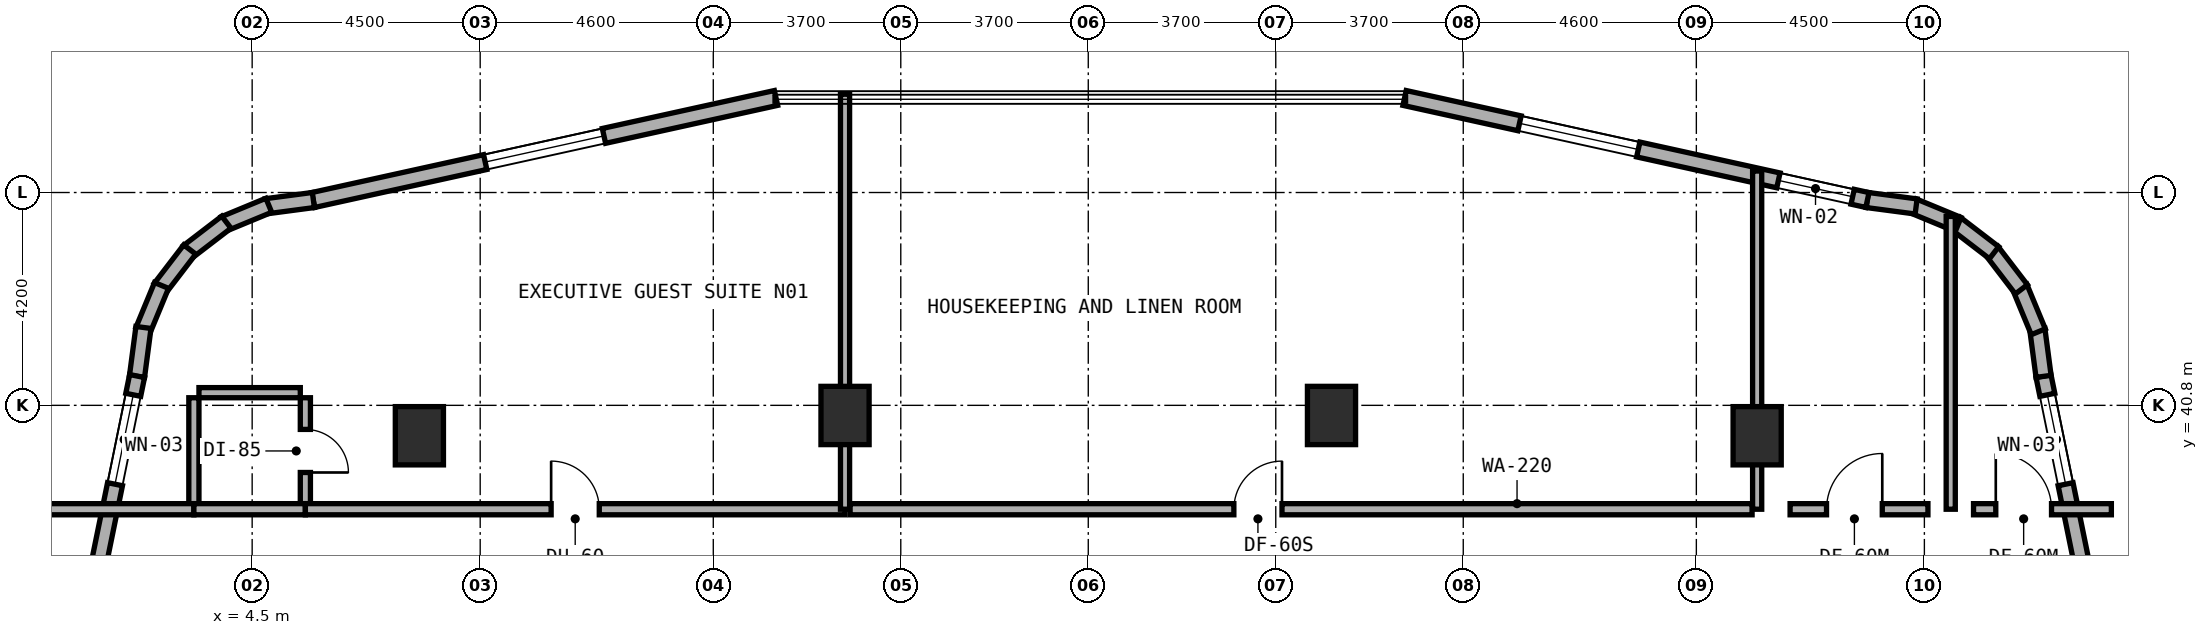
"""IFC4 building model, lengths in metres.
Left out: names, types, materials, properties, quantities, classifications, styles, units other than length and angle.
Written with IfcOpenShell. Run it as: python <this file> out.ifc"""

import sys

from ifc_helpers import new_model, si_unit, direction, frame, frame_2d, origin, origin_2d, place, context, subcontext, project, spatial, rectangle, extrude, element, fill, save


model = new_model("IFC4")
c1 = context("Model", 3, precision=1e-05, world=origin(), true_north=direction((0.0, 1.0)))
c2 = subcontext(c1, "Body", "Model", "MODEL_VIEW")
j1 = project(units=[si_unit("LENGTHUNIT", "METRE"), si_unit("PLANEANGLEUNIT", "RADIAN")], contexts=[c1])
p1 = place(None, origin())
s1 = spatial("IfcSite", under=j1, at=p1, CompositionType="ELEMENT")
p2 = place(p1, origin())
s2 = spatial("IfcBuilding", under=s1, at=p2, CompositionType="ELEMENT")
p3 = place(p2, frame((0.0, 0.0, 62.5)))
s3 = spatial("IfcBuildingStorey", under=s2, at=p3, CompositionType="ELEMENT", Elevation=62.5)
for number, where, z_axis, x_axis in (
    (1, (16.2, 40.6, 0.0), (0.0, 0.0, 1.0), (1.0, 0.0, 0.0)),
    (2, (25.8, 40.6, 0.0), (0.0, 0.0, 1.0), (1.0, 0.0, 0.0)),
    (3, (34.2, 40.2, 0.0), (0.0, 0.0, 1.0), (1.0, 0.0, 0.0)),
    (4, (7.8, 40.2, 0.0), (0.0, 0.0, 1.0), (1.0, 0.0, 0.0)),
):
    element("IfcColumn", number, at=place(p3, frame(where, z_axis=z_axis, x_axis=x_axis)), inside=s3, PredefinedType="COLUMN", context=c2, shape_type="SweptSolid", body=[
        extrude(rectangle(XDim=0.95, YDim=1.15, at=origin_2d()), origin(), (0.0, 0.0, 1.0), 3.5),
    ])
p4 = place(p3, frame((41.864, 31.516, 0.0), z_axis=(0.0, 0.0, 1.0), x_axis=(-0.199990901713, 0.979797754249, 0.0)))
e5 = element("IfcWall", 5, at=p4, inside=s3, PredefinedType="STANDARD", context=c2, shape_type="SweptSolid", body=[
    extrude(rectangle(XDim=10.065, YDim=0.3, at=frame_2d((5.033, 0.0))), origin(), (0.0, 0.0, 1.0), 3.22),
])
p5 = place(p4, frame((2.429, 0.0, 0.8)))
e6 = element("IfcOpeningElement", 6, at=p5, cuts=e5, PredefinedType="OPENING", context=c2, shape_type="SweptSolid", body=[
    extrude(rectangle(XDim=2.4, YDim=1.6, at=frame_2d((1.2, 0.8))), frame((0.0, 0.16, 0.0), z_axis=(0.0, -1.0, 0.0), x_axis=(1.0, 0.0, 0.0)), (0.0, 0.0, 1.0), 0.32),
])
p6 = place(p4, frame((7.887, 0.0, 0.85)))
e7 = element("IfcOpeningElement", 7, at=p6, cuts=e5, PredefinedType="OPENING", context=c2, shape_type="SweptSolid", body=[
    extrude(rectangle(XDim=1.8, YDim=1.5, at=frame_2d((0.9, 0.75))), frame((0.0, 0.16, 0.0), z_axis=(0.0, -1.0, 0.0), x_axis=(1.0, 0.0, 0.0)), (0.0, 0.0, 1.0), 0.32),
])
p7 = place(p3, frame((39.852, 41.372, 0.0), z_axis=(0.0, 0.0, 1.0), x_axis=(-0.131174864804, 0.991359246108, 0.0)))
e8 = element("IfcWall", 8, at=p7, inside=s3, PredefinedType="STANDARD", context=c2, shape_type="SweptSolid", body=[
    extrude(rectangle(XDim=0.938, YDim=0.3, at=frame_2d((0.469, 0.0))), origin(), (0.0, 0.0, 1.0), 3.22),
])
p8 = place(p3, frame((39.748, 42.252, 0.0), z_axis=(0.0, 0.0, 1.0), x_axis=(-0.382344263057, 0.924019948111, 0.0)))
e9 = element("IfcWall", 9, at=p8, inside=s3, PredefinedType="STANDARD", context=c2, shape_type="SweptSolid", body=[
    extrude(rectangle(XDim=0.955, YDim=0.3, at=frame_2d((0.477, 0.0))), origin(), (0.0, 0.0, 1.0), 3.22),
])
p9 = place(p3, frame((39.414, 43.089, 0.0), z_axis=(0.0, 0.0, 1.0), x_axis=(-0.608474481025, 0.793573440799, 0.0)))
e10 = element("IfcWall", 10, at=p9, inside=s3, PredefinedType="STANDARD", context=c2, shape_type="SweptSolid", body=[
    extrude(rectangle(XDim=0.955, YDim=0.3, at=frame_2d((0.478, 0.0))), origin(), (0.0, 0.0, 1.0), 3.22),
])
p10 = place(p3, frame((38.875, 43.812, 0.0), z_axis=(0.0, 0.0, 1.0), x_axis=(-0.793668068435, 0.608351047625, 0.0)))
e11 = element("IfcWall", 11, at=p10, inside=s3, PredefinedType="STANDARD", context=c2, shape_type="SweptSolid", body=[
    extrude(rectangle(XDim=0.955, YDim=0.3, at=frame_2d((0.478, 0.0))), origin(), (0.0, 0.0, 1.0), 3.22),
])
p11 = place(p3, frame((38.166, 44.369, 0.0), z_axis=(0.0, 0.0, 1.0), x_axis=(-0.924019948111, 0.382344263057, 0.0)))
e12 = element("IfcWall", 12, at=p11, inside=s3, PredefinedType="STANDARD", context=c2, shape_type="SweptSolid", body=[
    extrude(rectangle(XDim=0.955, YDim=0.3, at=frame_2d((0.477, 0.0))), origin(), (0.0, 0.0, 1.0), 3.22),
])
p12 = place(p3, frame((37.337, 44.725, 0.0), z_axis=(0.0, 0.0, 1.0), x_axis=(-0.991454295543, 0.130454512571, 0.0)))
e13 = element("IfcWall", 13, at=p12, inside=s3, PredefinedType="STANDARD", context=c2, shape_type="SweptSolid", body=[
    extrude(rectangle(XDim=0.973, YDim=0.3, at=frame_2d((0.487, 0.0))), origin(), (0.0, 0.0, 1.0), 3.22),
])
p13 = place(p3, frame((36.376, 44.852, 0.0), z_axis=(0.0, 0.0, 1.0), x_axis=(-0.97654500432, 0.215313386808, 0.0)))
e14 = element("IfcWall", 14, at=p13, inside=s3, PredefinedType="STANDARD", context=c2, shape_type="SweptSolid", body=[
    extrude(rectangle(XDim=9.354, YDim=0.3, at=frame_2d((4.677, 0.0))), origin(), (0.0, 0.0, 1.0), 3.22),
])
p14 = place(p13, frame((0.299, 0.0, 0.85)))
e15 = element("IfcOpeningElement", 15, at=p14, cuts=e14, PredefinedType="OPENING", context=c2, shape_type="SweptSolid", body=[
    extrude(rectangle(XDim=1.5, YDim=1.5, at=frame_2d((0.75, 0.75))), frame((0.0, 0.16, 0.0), z_axis=(0.0, -1.0, 0.0), x_axis=(1.0, 0.0, 0.0)), (0.0, 0.0, 1.0), 0.32),
])
p15 = place(p13, frame((4.631, 0.0, 0.8)))
e16 = element("IfcOpeningElement", 16, at=p15, cuts=e14, PredefinedType="OPENING", context=c2, shape_type="SweptSolid", body=[
    extrude(rectangle(XDim=2.4, YDim=1.6, at=frame_2d((1.2, 0.8))), frame((0.0, 0.16, 0.0), z_axis=(0.0, -1.0, 0.0), x_axis=(1.0, 0.0, 0.0)), (0.0, 0.0, 1.0), 0.32),
])
p16 = place(p3, frame((14.838, 46.866, 0.0), z_axis=(0.0, 0.0, 1.0), x_axis=(-0.9765437942, -0.215318875183, 0.0)))
e17 = element("IfcWall", 17, at=p16, inside=s3, PredefinedType="STANDARD", context=c2, shape_type="SweptSolid", body=[
    extrude(rectangle(XDim=9.353, YDim=0.3, at=frame_2d((4.677, 0.0))), origin(), (0.0, 0.0, 1.0), 3.22),
])
p17 = place(p16, frame((3.477, 0.0, 0.8)))
e18 = element("IfcOpeningElement", 18, at=p17, cuts=e17, PredefinedType="OPENING", context=c2, shape_type="SweptSolid", body=[
    extrude(rectangle(XDim=2.4, YDim=1.6, at=frame_2d((1.2, 0.8))), frame((0.0, 0.16, 0.0), z_axis=(0.0, -1.0, 0.0), x_axis=(1.0, 0.0, 0.0)), (0.0, 0.0, 1.0), 0.32),
])
p18 = place(p3, frame((5.708, 44.852, 0.0), z_axis=(0.0, 0.0, 1.0), x_axis=(-0.991359246108, -0.131174864804, 0.0)))
e19 = element("IfcWall", 19, at=p18, inside=s3, PredefinedType="STANDARD", context=c2, shape_type="SweptSolid", body=[
    extrude(rectangle(XDim=0.938, YDim=0.3, at=frame_2d((0.469, 0.0))), origin(), (0.0, 0.0, 1.0), 3.22),
])
p19 = place(p3, frame((4.828, 44.748, 0.0), z_axis=(0.0, 0.0, 1.0), x_axis=(-0.923982547689, -0.382434636986, 0.0)))
e20 = element("IfcWall", 20, at=p19, inside=s3, PredefinedType="STANDARD", context=c2, shape_type="SweptSolid", body=[
    extrude(rectangle(XDim=0.954, YDim=0.3, at=frame_2d((0.477, 0.0))), origin(), (0.0, 0.0, 1.0), 3.22),
])
for number, where, z_axis, x_axis in (
    (21, (3.991, 44.414, 0.0), (0.0, 0.0, 1.0), (-0.794, -0.608, 0.0)),
    (22, (3.268, 43.875, 0.0), (0.0, 0.0, 1.0), (-0.608, -0.794, 0.0)),
):
    element("IfcWall", number, at=place(p3, frame(where, z_axis=z_axis, x_axis=x_axis)), inside=s3, PredefinedType="STANDARD", context=c2, shape_type="SweptSolid", body=[
        extrude(rectangle(XDim=0.955, YDim=0.3, at=frame_2d((0.478, 0.0))), origin(), (0.0, 0.0, 1.0), 3.22),
    ])
p20 = place(p3, frame((2.711, 43.166, 0.0), z_axis=(0.0, 0.0, 1.0), x_axis=(-0.382344263057, -0.924019948111, 0.0)))
e23 = element("IfcWall", 23, at=p20, inside=s3, PredefinedType="STANDARD", context=c2, shape_type="SweptSolid", body=[
    extrude(rectangle(XDim=0.955, YDim=0.3, at=frame_2d((0.477, 0.0))), origin(), (0.0, 0.0, 1.0), 3.22),
])
p21 = place(p3, frame((2.355, 42.337, 0.0), z_axis=(0.0, 0.0, 1.0), x_axis=(-0.130454512571, -0.991454295543, 0.0)))
e24 = element("IfcWall", 24, at=p21, inside=s3, PredefinedType="STANDARD", context=c2, shape_type="SweptSolid", body=[
    extrude(rectangle(XDim=0.973, YDim=0.3, at=frame_2d((0.487, 0.0))), origin(), (0.0, 0.0, 1.0), 3.22),
])
p22 = place(p3, frame((2.229, 41.378, 0.0), z_axis=(0.0, 0.0, 1.0), x_axis=(-0.199990901713, -0.979797754249, 0.0)))
e25 = element("IfcWall", 25, at=p22, inside=s3, PredefinedType="STANDARD", context=c2, shape_type="SweptSolid", body=[
    extrude(rectangle(XDim=10.065, YDim=0.3, at=frame_2d((5.033, 0.0))), origin(), (0.0, 0.0, 1.0), 3.22),
])
p23 = place(p22, frame((0.378, 0.0, 0.85)))
e26 = element("IfcOpeningElement", 26, at=p23, cuts=e25, PredefinedType="OPENING", context=c2, shape_type="SweptSolid", body=[
    extrude(rectangle(XDim=1.8, YDim=1.5, at=frame_2d((0.9, 0.75))), frame((0.0, 0.16, 0.0), z_axis=(0.0, -1.0, 0.0), x_axis=(1.0, 0.0, 0.0)), (0.0, 0.0, 1.0), 0.32),
])
p24 = place(p22, frame((5.236, 0.0, 0.8)))
e27 = element("IfcOpeningElement", 27, at=p24, cuts=e25, PredefinedType="OPENING", context=c2, shape_type="SweptSolid", body=[
    extrude(rectangle(XDim=2.4, YDim=1.6, at=frame_2d((1.2, 0.8))), frame((0.0, 0.16, 0.0), z_axis=(0.0, -1.0, 0.0), x_axis=(1.0, 0.0, 0.0)), (0.0, 0.0, 1.0), 0.32),
])
p25 = place(p3, frame((5.55, 38.85, 0.0), z_axis=(0.0, 0.0, 1.0), x_axis=(0.0, 1.0, 0.0)))
e28 = element("IfcWall", 28, at=p25, inside=s3, PredefinedType="PLUMBINGWALL", context=c2, shape_type="SweptSolid", body=[
    extrude(rectangle(XDim=2.1, YDim=0.2, at=frame_2d((1.05, 0.0))), origin(), (0.0, 0.0, 1.0), 3.22),
])
p26 = place(p25, frame((0.625, 0.0, 0.0)))
e29 = element("IfcOpeningElement", 29, at=p26, cuts=e28, PredefinedType="OPENING", context=c2, shape_type="SweptSolid", body=[
    extrude(rectangle(XDim=0.85, YDim=2.1, at=frame_2d((0.425, 1.05))), frame((0.0, 0.11, 0.0), z_axis=(0.0, -1.0, 0.0), x_axis=(1.0, 0.0, 0.0)), (0.0, 0.0, 1.0), 0.22),
])
p27 = place(p3, frame((3.45, 41.05, 0.0), z_axis=(0.0, 0.0, 1.0), x_axis=(1.0, 0.0, 0.0)))
e30 = element("IfcWall", 30, at=p27, inside=s3, PredefinedType="PLUMBINGWALL", context=c2, shape_type="SweptSolid", body=[
    extrude(rectangle(XDim=2.0, YDim=0.2, at=frame_2d((1.0, 0.0))), origin(), (0.0, 0.0, 1.0), 3.22),
])
p28 = place(p3, frame((3.35, 38.85, 0.0), z_axis=(0.0, 0.0, 1.0), x_axis=(0.0, 1.0, 0.0)))
e31 = element("IfcWall", 31, at=p28, inside=s3, PredefinedType="PLUMBINGWALL", context=c2, shape_type="SweptSolid", body=[
    extrude(rectangle(XDim=2.1, YDim=0.2, at=frame_2d((1.05, 0.0))), origin(), (0.0, 0.0, 1.0), 3.22),
])
p29 = place(p3, frame((0.24, 38.75, 0.0), z_axis=(0.0, 0.0, 1.0), x_axis=(1.0, 0.0, 0.0)))
e32 = element("IfcWall", 32, at=p29, inside=s3, PredefinedType="SOLIDWALL", context=c2, shape_type="SweptSolid", body=[
    extrude(rectangle(XDim=3.11, YDim=0.22, at=frame_2d((1.555, 0.0))), origin(), (0.0, 0.0, 1.0), 3.22),
])
p30 = place(p3, frame((3.35, 38.75, 0.0), z_axis=(0.0, 0.0, 1.0), x_axis=(1.0, 0.0, 0.0)))
e33 = element("IfcWall", 33, at=p30, inside=s3, PredefinedType="SOLIDWALL", context=c2, shape_type="SweptSolid", body=[
    extrude(rectangle(XDim=2.2, YDim=0.22, at=frame_2d((1.1, 0.0))), origin(), (0.0, 0.0, 1.0), 3.22),
])
p31 = place(p3, frame((5.55, 38.75, 0.0), z_axis=(0.0, 0.0, 1.0), x_axis=(1.0, 0.0, 0.0)))
e34 = element("IfcWall", 34, at=p31, inside=s3, PredefinedType="SOLIDWALL", context=c2, shape_type="SweptSolid", body=[
    extrude(rectangle(XDim=10.65, YDim=0.22, at=frame_2d((5.325, 0.0))), origin(), (0.0, 0.0, 1.0), 2.495),
])
p32 = place(p31, frame((4.85, 0.0, 0.0)))
e35 = element("IfcOpeningElement", 35, at=p32, cuts=e34, PredefinedType="OPENING", context=c2, shape_type="SweptSolid", body=[
    extrude(rectangle(XDim=0.95, YDim=2.1, at=frame_2d((0.475, 1.05))), frame((0.0, 0.12, 0.0), z_axis=(0.0, -1.0, 0.0), x_axis=(1.0, 0.0, 0.0)), (0.0, 0.0, 1.0), 0.24),
])
p33 = place(p3, frame((16.2, 38.75, 0.0), z_axis=(0.0, 0.0, 1.0), x_axis=(0.0, 1.0, 0.0)))
e36 = element("IfcWall", 36, at=p33, inside=s3, PredefinedType="SOLIDWALL", context=c2, shape_type="SweptSolid", body=[
    extrude(rectangle(XDim=8.19, YDim=0.18, at=frame_2d((4.095, 0.0))), origin(), (0.0, 0.0, 1.0), 2.495),
])
p34 = place(p3, frame((16.3, 38.75, 0.0), z_axis=(0.0, 0.0, 1.0), x_axis=(1.0, 0.0, 0.0)))
e37 = element("IfcWall", 37, at=p34, inside=s3, PredefinedType="SOLIDWALL", context=c2, shape_type="SweptSolid", body=[
    extrude(rectangle(XDim=17.8, YDim=0.22, at=frame_2d((8.9, 0.0))), origin(), (0.0, 0.0, 1.0), 2.495),
])
p35 = place(p34, frame((7.573, 0.0, 0.0)))
e38 = element("IfcOpeningElement", 38, at=p35, cuts=e37, PredefinedType="OPENING", context=c2, shape_type="SweptSolid", body=[
    extrude(rectangle(XDim=0.95, YDim=2.1, at=frame_2d((0.475, 1.05))), frame((0.0, 0.12, 0.0), z_axis=(0.0, -1.0, 0.0), x_axis=(1.0, 0.0, 0.0)), (0.0, 0.0, 1.0), 0.24),
])
p36 = place(p3, frame((34.2, 38.75, 0.0), z_axis=(0.0, 0.0, 1.0), x_axis=(0.0, 1.0, 0.0)))
e39 = element("IfcWall", 39, at=p36, inside=s3, PredefinedType="SOLIDWALL", context=c2, shape_type="SweptSolid", body=[
    extrude(rectangle(XDim=6.674, YDim=0.18, at=frame_2d((3.337, 0.0))), origin(), (0.0, 0.0, 1.0), 2.495),
])
p37 = place(p3, frame((38.02, 38.75, 0.0), z_axis=(0.0, 0.0, 1.0), x_axis=(0.0, 1.0, 0.0)))
e40 = element("IfcWall", 40, at=p37, inside=s3, PredefinedType="SOLIDWALL", context=c2, shape_type="SweptSolid", body=[
    extrude(rectangle(XDim=5.778, YDim=0.18, at=frame_2d((2.889, 0.0))), origin(), (0.0, 0.0, 1.0), 3.22),
])
p38 = place(p3, frame((34.85, 38.75, 0.0), z_axis=(0.0, 0.0, 1.0), x_axis=(1.0, 0.0, 0.0)))
e41 = element("IfcWall", 41, at=p38, inside=s3, PredefinedType="SOLIDWALL", context=c2, shape_type="SweptSolid", body=[
    extrude(rectangle(XDim=2.72, YDim=0.22, at=frame_2d((1.36, 0.0))), origin(), (0.0, 0.0, 1.0), 3.22),
])
p39 = place(p38, frame((0.719, 0.0, 0.0)))
e42 = element("IfcOpeningElement", 42, at=p39, cuts=e41, PredefinedType="OPENING", context=c2, shape_type="SweptSolid", body=[
    extrude(rectangle(XDim=1.1, YDim=2.1, at=frame_2d((0.55, 1.05))), frame((0.0, 0.12, 0.0), z_axis=(0.0, -1.0, 0.0), x_axis=(1.0, 0.0, 0.0)), (0.0, 0.0, 1.0), 0.24),
])
p40 = place(p3, frame((38.47, 38.75, 0.0), z_axis=(0.0, 0.0, 1.0), x_axis=(1.0, 0.0, 0.0)))
e43 = element("IfcWall", 43, at=p40, inside=s3, PredefinedType="SOLIDWALL", context=c2, shape_type="SweptSolid", body=[
    extrude(rectangle(XDim=2.72, YDim=0.22, at=frame_2d((1.36, 0.0))), origin(), (0.0, 0.0, 1.0), 3.22),
])
p41 = place(p40, frame((0.439, 0.0, 0.0)))
e44 = element("IfcOpeningElement", 44, at=p41, cuts=e43, PredefinedType="OPENING", context=c2, shape_type="SweptSolid", body=[
    extrude(rectangle(XDim=1.1, YDim=2.1, at=frame_2d((0.55, 1.05))), frame((0.0, 0.12, 0.0), z_axis=(0.0, -1.0, 0.0), x_axis=(1.0, 0.0, 0.0)), (0.0, 0.0, 1.0), 0.24),
])
p42 = place(p6, origin())
e45 = element("IfcWindow", 45, at=p42, inside=s3, PartitioningType="SINGLE_PANEL", PredefinedType="WINDOW", context=c2, shape_type="SweptSolid", body=[
    extrude(rectangle(XDim=1.8, YDim=1.5, at=frame_2d((0.9, 0.75))), frame((0.0, 0.03, 0.0), z_axis=(0.0, -1.0, 0.0), x_axis=(1.0, 0.0, 0.0)), (0.0, 0.0, 1.0), 0.06),
])
fill(e7, e45)
p43 = place(p14, origin())
e46 = element("IfcWindow", 46, at=p43, inside=s3, PartitioningType="SINGLE_PANEL", PredefinedType="WINDOW", context=c2, shape_type="SweptSolid", body=[
    extrude(rectangle(XDim=1.5, YDim=1.5, at=frame_2d((0.75, 0.75))), frame((0.0, 0.03, 0.0), z_axis=(0.0, -1.0, 0.0), x_axis=(1.0, 0.0, 0.0)), (0.0, 0.0, 1.0), 0.06),
])
fill(e15, e46)
p44 = place(p15, origin())
e47 = element("IfcWindow", 47, at=p44, inside=s3, PartitioningType="SINGLE_PANEL", PredefinedType="WINDOW", context=c2, shape_type="SweptSolid", body=[
    extrude(rectangle(XDim=2.4, YDim=1.6, at=frame_2d((1.2, 0.8))), frame((0.0, 0.03, 0.0), z_axis=(0.0, -1.0, 0.0), x_axis=(1.0, 0.0, 0.0)), (0.0, 0.0, 1.0), 0.06),
])
fill(e16, e47)
p45 = place(p17, origin())
e48 = element("IfcWindow", 48, at=p45, inside=s3, PartitioningType="SINGLE_PANEL", PredefinedType="WINDOW", context=c2, shape_type="SweptSolid", body=[
    extrude(rectangle(XDim=2.4, YDim=1.6, at=frame_2d((1.2, 0.8))), frame((0.0, 0.03, 0.0), z_axis=(0.0, -1.0, 0.0), x_axis=(1.0, 0.0, 0.0)), (0.0, 0.0, 1.0), 0.06),
])
fill(e18, e48)
p46 = place(p23, origin())
e49 = element("IfcWindow", 49, at=p46, inside=s3, PartitioningType="SINGLE_PANEL", PredefinedType="WINDOW", context=c2, shape_type="SweptSolid", body=[
    extrude(rectangle(XDim=1.8, YDim=1.5, at=frame_2d((0.9, 0.75))), frame((0.0, 0.03, 0.0), z_axis=(0.0, -1.0, 0.0), x_axis=(1.0, 0.0, 0.0)), (0.0, 0.0, 1.0), 0.06),
])
fill(e26, e49)
p47 = place(p26, frame((0.85, 0.0, 0.0), z_axis=(0.0, 0.0, 1.0), x_axis=(-1.0, 0.0, 0.0)))
e50 = element("IfcDoor", 50, at=p47, inside=s3, OperationType="SINGLE_SWING_RIGHT", PredefinedType="DOOR", context=c2, shape_type="SweptSolid", body=[
    extrude(rectangle(XDim=0.85, YDim=2.1, at=frame_2d((0.425, 1.05))), frame((0.0, 0.025, 0.0), z_axis=(0.0, -1.0, 0.0), x_axis=(1.0, 0.0, 0.0)), (0.0, 0.0, 1.0), 0.05),
])
fill(e29, e50)
p48 = place(p32, origin())
e51 = element("IfcDoor", 51, at=p48, inside=s3, OperationType="SINGLE_SWING_LEFT", PredefinedType="DOOR", context=c2, shape_type="SweptSolid", body=[
    extrude(rectangle(XDim=0.95, YDim=2.1, at=frame_2d((0.475, 1.05))), frame((0.0, 0.025, 0.0), z_axis=(0.0, -1.0, 0.0), x_axis=(1.0, 0.0, 0.0)), (0.0, 0.0, 1.0), 0.05),
])
fill(e35, e51)
p49 = place(p35, origin())
e52 = element("IfcDoor", 52, at=p49, inside=s3, OperationType="SINGLE_SWING_RIGHT", PredefinedType="DOOR", context=c2, shape_type="SweptSolid", body=[
    extrude(rectangle(XDim=0.95, YDim=2.1, at=frame_2d((0.475, 1.05))), frame((0.0, 0.025, 0.0), z_axis=(0.0, -1.0, 0.0), x_axis=(1.0, 0.0, 0.0)), (0.0, 0.0, 1.0), 0.05),
])
fill(e38, e52)
p50 = place(p39, origin())
e53 = element("IfcDoor", 53, at=p50, inside=s3, OperationType="SINGLE_SWING_RIGHT", PredefinedType="DOOR", context=c2, shape_type="SweptSolid", body=[
    extrude(rectangle(XDim=1.1, YDim=2.1, at=frame_2d((0.55, 1.05))), frame((0.0, 0.025, 0.0), z_axis=(0.0, -1.0, 0.0), x_axis=(1.0, 0.0, 0.0)), (0.0, 0.0, 1.0), 0.05),
])
fill(e42, e53)
p51 = place(p41, origin())
e54 = element("IfcDoor", 54, at=p51, inside=s3, OperationType="SINGLE_SWING_LEFT", PredefinedType="DOOR", context=c2, shape_type="SweptSolid", body=[
    extrude(rectangle(XDim=1.1, YDim=2.1, at=frame_2d((0.55, 1.05))), frame((0.0, 0.025, 0.0), z_axis=(0.0, -1.0, 0.0), x_axis=(1.0, 0.0, 0.0)), (0.0, 0.0, 1.0), 0.05),
])
fill(e44, e54)
save(model, sys.argv[1])
